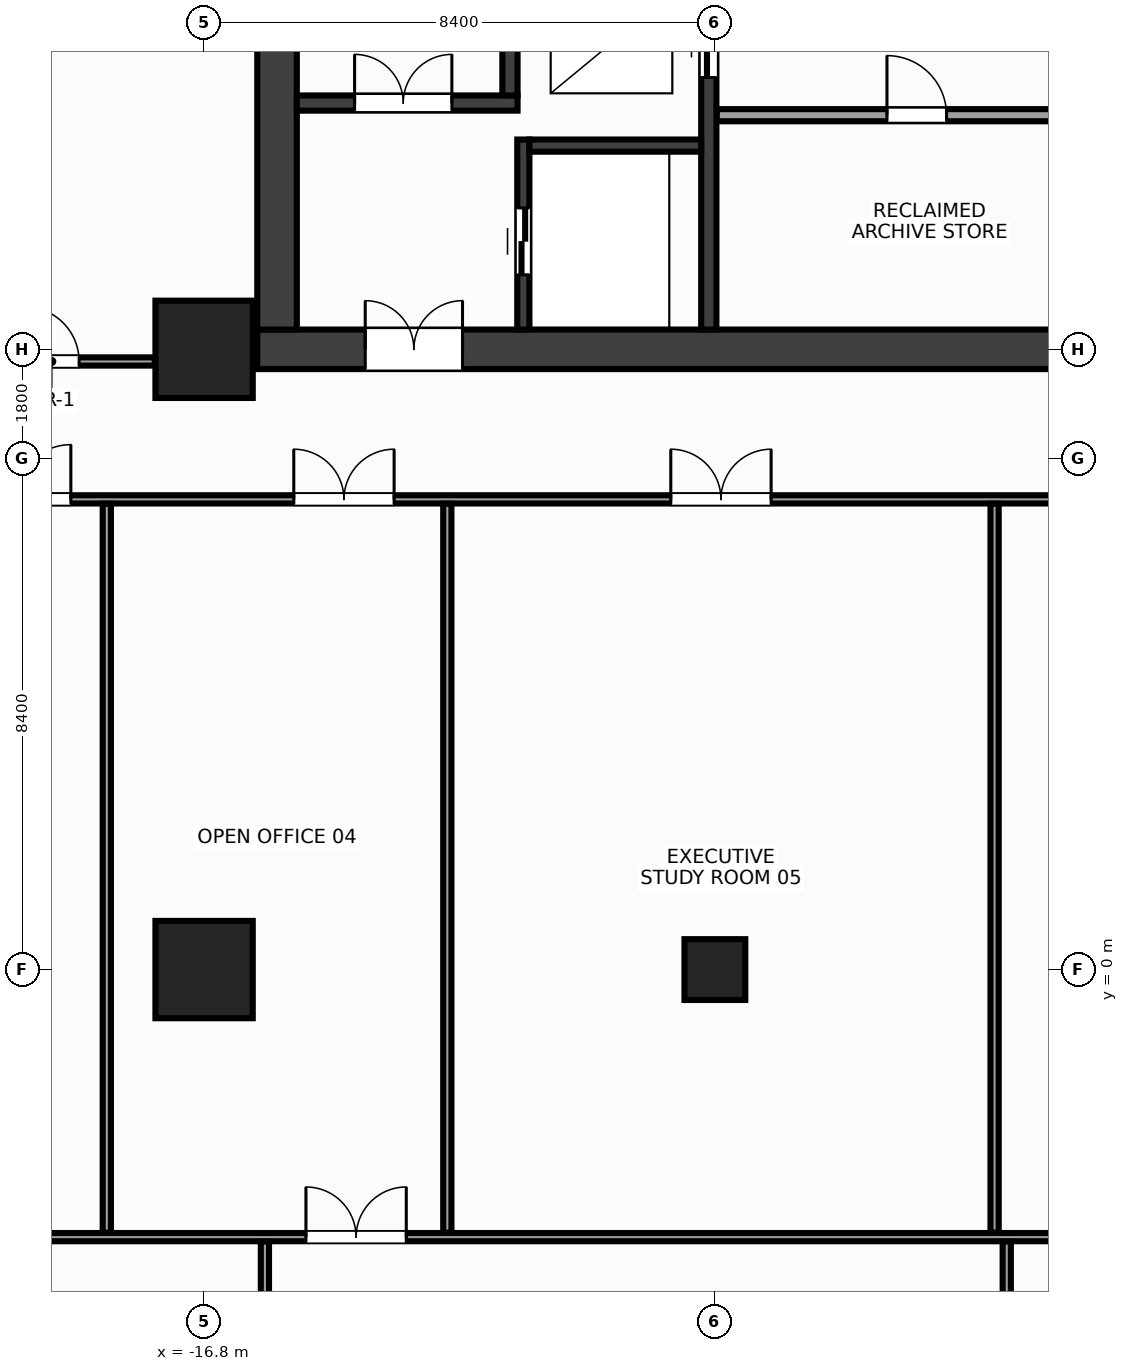
"""IFC4 building model, lengths in metres.
Left out: names, types, materials, properties, quantities, classifications, styles, units other than length and angle.
Written with IfcOpenShell. Run it as: python <this file> out.ifc"""

import sys

from ifc_helpers import new_model, si_unit, direction, frame, frame_2d, origin, origin_2d, place, context, subcontext, project, spatial, rectangle, hollow_rectangle, extrude, source, transform, mapped, element, fill, save


model = new_model("IFC4")
c1 = context("Model", 3, precision=1e-05, world=origin(), true_north=direction((0.0, 1.0)))
c2 = subcontext(c1, "Body", "Model", "MODEL_VIEW")
j1 = project(units=[si_unit("LENGTHUNIT", "METRE"), si_unit("PLANEANGLEUNIT", "RADIAN")], contexts=[c1])
p1 = place(None, origin())
s1 = spatial("IfcSite", under=j1, at=p1, CompositionType="ELEMENT")
p2 = place(p1, origin())
s2 = spatial("IfcBuilding", under=s1, at=p2, CompositionType="ELEMENT")
p3 = place(p2, frame((0.0, 0.0, 131.6)))
s3 = spatial("IfcBuildingStorey", under=s2, at=p3, CompositionType="ELEMENT", Elevation=131.6)
m1 = source(origin(), c2, "Body", "SweptSolid", [
    extrude(rectangle(XDim=31.85, YDim=0.65, at=frame_2d((15.925, 0.0))), origin(), (0.0, 0.0, 1.0), 3.6),
])
p4 = place(p3, frame((-15.925, 10.2, 0.0), z_axis=(0.0, 0.0, 1.0), x_axis=(1.0, 0.0, 0.0)))
e1 = element("IfcWall", 1, at=p4, inside=s3, PredefinedType="SHEAR", context=c2, shape_type="MappedRepresentation", body=[
    mapped(m1, transform((0.0, 0.0, 0.0), x_axis=(1.0, 0.0, 0.0), y_axis=(0.0, 1.0, 0.0), z_axis=(0.0, 0.0, 1.0), scale=1.0)),
])
p5 = place(p4, frame((1.775, 0.0, 0.0)))
e2 = element("IfcOpeningElement", 2, at=p5, cuts=e1, PredefinedType="OPENING", context=c2, shape_type="SweptSolid", body=[
    extrude(rectangle(XDim=1.6, YDim=2.15, at=frame_2d((0.8, 1.075))), frame((0.0, 0.337, 0.0), z_axis=(0.0, -1.0, 0.0), x_axis=(1.0, 0.0, 0.0)), (0.0, 0.0, 1.0), 0.674),
])
p6 = place(p4, frame((28.475, 0.0, 0.0)))
e3 = element("IfcOpeningElement", 3, at=p6, cuts=e1, PredefinedType="OPENING", context=c2, shape_type="SweptSolid", body=[
    extrude(rectangle(XDim=1.6, YDim=2.15, at=frame_2d((0.8, 1.075))), frame((0.0, 0.337, 0.0), z_axis=(0.0, -1.0, 0.0), x_axis=(1.0, 0.0, 0.0)), (0.0, 0.0, 1.0), 0.674),
])
p7 = place(p4, frame((15.175, 0.0, 0.0)))
e4 = element("IfcOpeningElement", 4, at=p7, cuts=e1, PredefinedType="OPENING", context=c2, shape_type="SweptSolid", body=[
    extrude(rectangle(XDim=1.5, YDim=2.2, at=frame_2d((0.75, 1.1))), frame((0.0, 0.337, 0.0), z_axis=(0.0, -1.0, 0.0), x_axis=(1.0, 0.0, 0.0)), (0.0, 0.0, 1.0), 0.674),
])
m2 = source(origin(), c2, "Body", "SweptSolid", [
    extrude(rectangle(XDim=12.95, YDim=0.65, at=frame_2d((6.475, 0.0))), origin(), (0.0, 0.0, 1.0), 3.6),
])
p8 = place(p3, frame((-15.6, 10.525, 0.0), z_axis=(0.0, 0.0, 1.0), x_axis=(0.0, 1.0, 0.0)))
e5 = element("IfcWall", 5, at=p8, inside=s3, PredefinedType="SHEAR", context=c2, shape_type="MappedRepresentation", body=[
    mapped(m2, transform((0.0, 0.0, 0.0), x_axis=(1.0, 0.0, 0.0), y_axis=(0.0, 1.0, 0.0), z_axis=(0.0, 0.0, 1.0), scale=1.0)),
])
m3 = source(origin(), c2, "Body", "SweptSolid", [
    extrude(rectangle(XDim=12.95, YDim=0.25, at=frame_2d((6.475, 0.0))), origin(), (0.0, 0.0, 1.0), 3.6),
])
p9 = place(p3, frame((-8.5, 10.525, 0.0), z_axis=(0.0, 0.0, 1.0), x_axis=(0.0, 1.0, 0.0)))
e6 = element("IfcWall", 6, at=p9, inside=s3, PredefinedType="SHEAR", context=c2, shape_type="MappedRepresentation", body=[
    mapped(m3, transform((0.0, 0.0, 0.0), x_axis=(1.0, 0.0, 0.0), y_axis=(0.0, 1.0, 0.0), z_axis=(0.0, 0.0, 1.0), scale=1.0)),
])
p10 = place(p9, frame((4.145, 0.0, 0.0)))
e7 = element("IfcOpeningElement", 7, at=p10, cuts=e6, PredefinedType="OPENING", context=c2, shape_type="SweptSolid", body=[
    extrude(rectangle(XDim=1.1, YDim=2.15, at=frame_2d((0.55, 1.075))), frame((0.0, 0.137, 0.0), z_axis=(0.0, -1.0, 0.0), x_axis=(1.0, 0.0, 0.0)), (0.0, 0.0, 1.0), 0.274),
])
p11 = place(p9, frame((6.065, 0.0, 0.0)))
e8 = element("IfcOpeningElement", 8, at=p11, cuts=e6, PredefinedType="OPENING", context=c2, shape_type="SweptSolid", body=[
    extrude(rectangle(XDim=1.1, YDim=2.15, at=frame_2d((0.55, 1.075))), frame((0.0, 0.137, 0.0), z_axis=(0.0, -1.0, 0.0), x_axis=(1.0, 0.0, 0.0)), (0.0, 0.0, 1.0), 0.274),
])
p12 = place(p9, frame((7.985, 0.0, 0.0)))
e9 = element("IfcOpeningElement", 9, at=p12, cuts=e6, PredefinedType="OPENING", context=c2, shape_type="SweptSolid", body=[
    extrude(rectangle(XDim=1.1, YDim=2.15, at=frame_2d((0.55, 1.075))), frame((0.0, 0.137, 0.0), z_axis=(0.0, -1.0, 0.0), x_axis=(1.0, 0.0, 0.0)), (0.0, 0.0, 1.0), 0.274),
])
m4 = source(origin(), c2, "Body", "SweptSolid", [
    extrude(rectangle(XDim=3.63, YDim=0.25, at=frame_2d((1.815, 0.0))), origin(), (0.0, 0.0, 1.0), 3.6),
])
p13 = place(p3, frame((-15.275, 14.25, 0.0), z_axis=(0.0, 0.0, 1.0), x_axis=(1.0, 0.0, 0.0)))
e10 = element("IfcWall", 10, at=p13, inside=s3, PredefinedType="SHEAR", context=c2, shape_type="MappedRepresentation", body=[
    mapped(m4, transform((0.0, 0.0, 0.0), x_axis=(1.0, 0.0, 0.0), y_axis=(0.0, 1.0, 0.0), z_axis=(0.0, 0.0, 1.0), scale=1.0)),
])
p14 = place(p13, frame((0.95, 0.0, 0.0)))
e11 = element("IfcOpeningElement", 11, at=p14, cuts=e10, PredefinedType="OPENING", context=c2, shape_type="SweptSolid", body=[
    extrude(rectangle(XDim=1.6, YDim=2.15, at=frame_2d((0.8, 1.075))), frame((0.0, 0.137, 0.0), z_axis=(0.0, -1.0, 0.0), x_axis=(1.0, 0.0, 0.0)), (0.0, 0.0, 1.0), 0.274),
])
m5 = source(origin(), c2, "Body", "SweptSolid", [
    extrude(rectangle(XDim=9.1, YDim=0.25, at=frame_2d((4.55, 0.0))), origin(), (0.0, 0.0, 1.0), 3.6),
])
p15 = place(p3, frame((-11.77, 14.375, 0.0), z_axis=(0.0, 0.0, 1.0), x_axis=(0.0, 1.0, 0.0)))
e12 = element("IfcWall", 12, at=p15, inside=s3, PredefinedType="SHEAR", context=c2, shape_type="MappedRepresentation", body=[
    mapped(m5, transform((0.0, 0.0, 0.0), x_axis=(1.0, 0.0, 0.0), y_axis=(0.0, 1.0, 0.0), z_axis=(0.0, 0.0, 1.0), scale=1.0)),
])
m6 = source(origin(), c2, "Body", "SweptSolid", [
    extrude(rectangle(XDim=3.125, YDim=0.2, at=frame_2d((1.562, 0.0))), origin(), (0.0, 0.0, 1.0), 3.6),
])
p16 = place(p3, frame((-11.55, 10.525, 0.0), z_axis=(0.0, 0.0, 1.0), x_axis=(0.0, 1.0, 0.0)))
e13 = element("IfcWall", 13, at=p16, inside=s3, PredefinedType="SHEAR", context=c2, shape_type="MappedRepresentation", body=[
    mapped(m6, transform((0.0, 0.0, 0.0), x_axis=(1.0, 0.0, 0.0), y_axis=(0.0, 1.0, 0.0), z_axis=(0.0, 0.0, 1.0), scale=1.0)),
])
p17 = place(p16, frame((0.9, 0.0, 0.0)))
e14 = element("IfcOpeningElement", 14, at=p17, cuts=e13, PredefinedType="OPENING", context=c2, shape_type="SweptSolid", body=[
    extrude(rectangle(XDim=1.1, YDim=2.15, at=frame_2d((0.55, 1.075))), frame((0.0, 0.112, 0.0), z_axis=(0.0, -1.0, 0.0), x_axis=(1.0, 0.0, 0.0)), (0.0, 0.0, 1.0), 0.224),
])
m7 = source(origin(), c2, "Body", "SweptSolid", [
    extrude(rectangle(XDim=2.825, YDim=0.2, at=frame_2d((1.413, 0.0))), origin(), (0.0, 0.0, 1.0), 3.6),
])
p18 = place(p3, frame((-11.45, 13.55, 0.0), z_axis=(0.0, 0.0, 1.0), x_axis=(1.0, 0.0, 0.0)))
e15 = element("IfcWall", 15, at=p18, inside=s3, PredefinedType="SHEAR", context=c2, shape_type="MappedRepresentation", body=[
    mapped(m7, transform((0.0, 0.0, 0.0), x_axis=(1.0, 0.0, 0.0), y_axis=(0.0, 1.0, 0.0), z_axis=(0.0, 0.0, 1.0), scale=1.0)),
])
m8 = source(origin(), c2, "Body", "SweptSolid", [
    extrude(rectangle(XDim=1.6, YDim=1.6, at=origin_2d()), origin(), (0.0, 0.0, 1.0), 3.6),
])
for number, where, z_axis, x_axis in (
    (16, (-16.8, 0.0, 0.0), (0.0, 0.0, 1.0), (1.0, 0.0, 0.0)),
    (17, (-16.8, 10.2, 0.0), (0.0, 0.0, 1.0), (1.0, 0.0, 0.0)),
):
    element("IfcColumn", number, at=place(p3, frame(where, z_axis=z_axis, x_axis=x_axis)), inside=s3, PredefinedType="COLUMN", context=c2, shape_type="MappedRepresentation", body=[
        mapped(m8, transform((0.0, 0.0, 0.0), x_axis=(1.0, 0.0, 0.0), y_axis=(0.0, 1.0, 0.0), z_axis=(0.0, 0.0, 1.0), scale=1.0)),
    ])
m9 = source(origin(), c2, "Body", "SweptSolid", [
    extrude(hollow_rectangle(XDim=1.0, YDim=1.0, WallThickness=0.045, at=origin_2d()), origin(), (0.0, 0.0, 1.0), 3.6),
])
p19 = place(p3, frame((-8.4, 0.0, 0.0), z_axis=(0.0, 0.0, 1.0), x_axis=(1.0, 0.0, 0.0)))
e18 = element("IfcColumn", 18, at=p19, inside=s3, PredefinedType="COLUMN", context=c2, shape_type="MappedRepresentation", body=[
    mapped(m9, transform((0.0, 0.0, 0.0), x_axis=(1.0, 0.0, 0.0), y_axis=(0.0, 1.0, 0.0), z_axis=(0.0, 0.0, 1.0), scale=1.0)),
])
m10 = source(origin(), c2, "Body", "SweptSolid", [
    extrude(rectangle(XDim=7.07, YDim=0.2, at=frame_2d((3.535, 0.0))), origin(), (0.0, 0.0, 1.0), 3.38),
])
p20 = place(p3, frame((-8.37, 14.05, 0.0), z_axis=(0.0, 0.0, 1.0), x_axis=(1.0, 0.0, 0.0)))
e19 = element("IfcWall", 19, at=p20, inside=s3, PredefinedType="PARTITIONING", context=c2, shape_type="MappedRepresentation", body=[
    mapped(m10, transform((0.0, 0.0, 0.0), x_axis=(1.0, 0.0, 0.0), y_axis=(0.0, 1.0, 0.0), z_axis=(0.0, 0.0, 1.0), scale=1.0)),
])
p21 = place(p20, frame((2.8, 0.0, 0.0)))
e20 = element("IfcOpeningElement", 20, at=p21, cuts=e19, PredefinedType="OPENING", context=c2, shape_type="SweptSolid", body=[
    extrude(rectangle(XDim=0.98, YDim=2.15, at=frame_2d((0.49, 1.075))), frame((0.0, 0.112, 0.0), z_axis=(0.0, -1.0, 0.0), x_axis=(1.0, 0.0, 0.0)), (0.0, 0.0, 1.0), 0.224),
])
m11 = source(origin(), c2, "Body", "SweptSolid", [
    extrude(rectangle(XDim=4.38, YDim=0.135, at=frame_2d((2.19, 0.0))), origin(), (0.0, 0.0, 1.0), 2.915),
])
p22 = place(p3, frame((-21.99, 10.0, 0.0), z_axis=(0.0, 0.0, 1.0), x_axis=(1.0, 0.0, 0.0)))
e21 = element("IfcWall", 21, at=p22, inside=s3, PredefinedType="PARTITIONING", context=c2, shape_type="MappedRepresentation", body=[
    mapped(m11, transform((0.0, 0.0, 0.0), x_axis=(1.0, 0.0, 0.0), y_axis=(0.0, 1.0, 0.0), z_axis=(0.0, 0.0, 1.0), scale=1.0)),
])
p23 = place(p22, frame((2.235, 0.0, 0.0)))
e22 = element("IfcOpeningElement", 22, at=p23, cuts=e21, PredefinedType="OPENING", context=c2, shape_type="SweptSolid", body=[
    extrude(rectangle(XDim=0.9, YDim=2.15, at=frame_2d((0.45, 1.075))), frame((0.0, 0.08, 0.0), z_axis=(0.0, -1.0, 0.0), x_axis=(1.0, 0.0, 0.0)), (0.0, 0.0, 1.0), 0.159),
])
m12 = source(origin(), c2, "Body", "SweptSolid", [
    extrude(rectangle(XDim=31.6, YDim=0.135, at=frame_2d((15.8, 0.0))), origin(), (0.0, 0.0, 1.0), 2.765),
])
p24 = place(p3, frame((-20.535, 7.732, 0.0), z_axis=(0.0, 0.0, 1.0), x_axis=(1.0, 0.0, 0.0)))
e23 = element("IfcWall", 23, at=p24, inside=s3, PredefinedType="PARTITIONING", context=c2, shape_type="MappedRepresentation", body=[
    mapped(m12, transform((0.0, 0.0, 0.0), x_axis=(1.0, 0.0, 0.0), y_axis=(0.0, 1.0, 0.0), z_axis=(0.0, 0.0, 1.0), scale=1.0)),
])
p25 = place(p24, frame((0.644, 0.0, 0.0)))
e24 = element("IfcOpeningElement", 24, at=p25, cuts=e23, PredefinedType="OPENING", context=c2, shape_type="SweptSolid", body=[
    extrude(rectangle(XDim=0.9, YDim=2.15, at=frame_2d((0.45, 1.075))), frame((0.0, 0.08, 0.0), z_axis=(0.0, -1.0, 0.0), x_axis=(1.0, 0.0, 0.0)), (0.0, 0.0, 1.0), 0.159),
])
p26 = place(p24, frame((5.21, 0.0, 0.0)))
e25 = element("IfcOpeningElement", 25, at=p26, cuts=e23, PredefinedType="OPENING", context=c2, shape_type="SweptSolid", body=[
    extrude(rectangle(XDim=1.65, YDim=2.35, at=frame_2d((0.825, 1.175))), frame((0.0, 0.08, 0.0), z_axis=(0.0, -1.0, 0.0), x_axis=(1.0, 0.0, 0.0)), (0.0, 0.0, 1.0), 0.159),
])
p27 = place(p24, frame((11.41, 0.0, 0.0)))
e26 = element("IfcOpeningElement", 26, at=p27, cuts=e23, PredefinedType="OPENING", context=c2, shape_type="SweptSolid", body=[
    extrude(rectangle(XDim=1.65, YDim=2.35, at=frame_2d((0.825, 1.175))), frame((0.0, 0.08, 0.0), z_axis=(0.0, -1.0, 0.0), x_axis=(1.0, 0.0, 0.0)), (0.0, 0.0, 1.0), 0.159),
])
p28 = place(p24, frame((19.91, 0.0, 0.0)))
e27 = element("IfcOpeningElement", 27, at=p28, cuts=e23, PredefinedType="OPENING", context=c2, shape_type="SweptSolid", body=[
    extrude(rectangle(XDim=1.65, YDim=2.35, at=frame_2d((0.825, 1.175))), frame((0.0, 0.08, 0.0), z_axis=(0.0, -1.0, 0.0), x_axis=(1.0, 0.0, 0.0)), (0.0, 0.0, 1.0), 0.159),
])
p29 = place(p24, frame((27.316, 0.0, 0.0)))
e28 = element("IfcOpeningElement", 28, at=p29, cuts=e23, PredefinedType="OPENING", context=c2, shape_type="SweptSolid", body=[
    extrude(rectangle(XDim=1.65, YDim=2.35, at=frame_2d((0.825, 1.175))), frame((0.0, 0.08, 0.0), z_axis=(0.0, -1.0, 0.0), x_axis=(1.0, 0.0, 0.0)), (0.0, 0.0, 1.0), 0.159),
])
m13 = source(origin(), c2, "Body", "SweptSolid", [
    extrude(rectangle(XDim=34.91, YDim=0.135, at=frame_2d((17.455, 0.0))), origin(), (0.0, 0.0, 1.0), 2.765),
])
p30 = place(p3, frame((-23.85, -4.4, 0.0), z_axis=(0.0, 0.0, 1.0), x_axis=(1.0, 0.0, 0.0)))
e29 = element("IfcWall", 29, at=p30, inside=s3, PredefinedType="PARTITIONING", context=c2, shape_type="MappedRepresentation", body=[
    mapped(m13, transform((0.0, 0.0, 0.0), x_axis=(1.0, 0.0, 0.0), y_axis=(0.0, 1.0, 0.0), z_axis=(0.0, 0.0, 1.0), scale=1.0)),
])
p31 = place(p30, frame((1.266, 0.0, 0.0)))
e30 = element("IfcOpeningElement", 30, at=p31, cuts=e29, PredefinedType="OPENING", context=c2, shape_type="SweptSolid", body=[
    extrude(rectangle(XDim=1.65, YDim=2.35, at=frame_2d((0.825, 1.175))), frame((0.0, 0.08, 0.0), z_axis=(0.0, -1.0, 0.0), x_axis=(1.0, 0.0, 0.0)), (0.0, 0.0, 1.0), 0.159),
])
p32 = place(p30, frame((8.725, 0.0, 0.0)))
e31 = element("IfcOpeningElement", 31, at=p32, cuts=e29, PredefinedType="OPENING", context=c2, shape_type="SweptSolid", body=[
    extrude(rectangle(XDim=1.65, YDim=2.35, at=frame_2d((0.825, 1.175))), frame((0.0, 0.08, 0.0), z_axis=(0.0, -1.0, 0.0), x_axis=(1.0, 0.0, 0.0)), (0.0, 0.0, 1.0), 0.159),
])
p33 = place(p30, frame((23.325, 0.0, 0.0)))
e32 = element("IfcOpeningElement", 32, at=p33, cuts=e29, PredefinedType="OPENING", context=c2, shape_type="SweptSolid", body=[
    extrude(rectangle(XDim=1.65, YDim=2.35, at=frame_2d((0.825, 1.175))), frame((0.0, 0.08, 0.0), z_axis=(0.0, -1.0, 0.0), x_axis=(1.0, 0.0, 0.0)), (0.0, 0.0, 1.0), 0.159),
])
m14 = source(origin(), c2, "Body", "SweptSolid", [
    extrude(rectangle(XDim=11.987, YDim=0.135, at=frame_2d((5.994, 0.0))), origin(), (0.0, 0.0, 1.0), 2.915),
])
p34 = place(p3, frame((-18.4, -4.327, 0.0), z_axis=(0.0, 0.0, 1.0), x_axis=(0.0, 1.0, 0.0)))
e33 = element("IfcWall", 33, at=p34, inside=s3, PredefinedType="PARTITIONING", context=c2, shape_type="MappedRepresentation", body=[
    mapped(m14, transform((0.0, 0.0, 0.0), x_axis=(1.0, 0.0, 0.0), y_axis=(0.0, 1.0, 0.0), z_axis=(0.0, 0.0, 1.0), scale=1.0)),
])
m15 = source(origin(), c2, "Body", "SweptSolid", [
    extrude(rectangle(XDim=11.987, YDim=0.135, at=frame_2d((5.994, 0.0))), origin(), (0.0, 0.0, 1.0), 2.665),
])
for number, where, z_axis, x_axis in (
    (34, (-12.8, -4.327, 0.0), (0.0, 0.0, 1.0), (0.0, 1.0, 0.0)),
    (35, (-3.8, -4.327, 0.0), (0.0, 0.0, 1.0), (0.0, 1.0, 0.0)),
):
    element("IfcWall", number, at=place(p3, frame(where, z_axis=z_axis, x_axis=x_axis)), inside=s3, PredefinedType="PARTITIONING", context=c2, shape_type="MappedRepresentation", body=[
        mapped(m15, transform((0.0, 0.0, 0.0), x_axis=(1.0, 0.0, 0.0), y_axis=(0.0, 1.0, 0.0), z_axis=(0.0, 0.0, 1.0), scale=1.0)),
    ])
m16 = source(origin(), c2, "Body", "SweptSolid", [
    extrude(rectangle(XDim=18.177, YDim=0.135, at=frame_2d((9.089, 0.0))), origin(), (0.0, 0.0, 1.0), 2.915),
])
for number, where, z_axis, x_axis in (
    (36, (-15.8, -22.65, 0.0), (0.0, 0.0, 1.0), (0.0, 1.0, 0.0)),
    (37, (-3.6, -22.65, 0.0), (0.0, 0.0, 1.0), (0.0, 1.0, 0.0)),
):
    element("IfcWall", number, at=place(p3, frame(where, z_axis=z_axis, x_axis=x_axis)), inside=s3, PredefinedType="PARTITIONING", context=c2, shape_type="MappedRepresentation", body=[
        mapped(m16, transform((0.0, 0.0, 0.0), x_axis=(1.0, 0.0, 0.0), y_axis=(0.0, 1.0, 0.0), z_axis=(0.0, 0.0, 1.0), scale=1.0)),
    ])
m17 = source(origin(), c2, "Body", "SweptSolid", [
    extrude(rectangle(XDim=1.6, YDim=2.15, at=frame_2d((0.8, 1.075))), frame((0.0, 0.025, 0.0), z_axis=(0.0, -1.0, 0.0), x_axis=(1.0, 0.0, 0.0)), (0.0, 0.0, 1.0), 0.05),
])
p35 = place(p14, origin())
e38 = element("IfcDoor", 38, at=p35, inside=s3, OperationType="DOUBLE_DOOR_SINGLE_SWING", PredefinedType="DOOR", context=c2, shape_type="MappedRepresentation", body=[
    mapped(m17, transform((0.0, 0.0, 0.0), x_axis=(1.0, 0.0, 0.0), y_axis=(0.0, 1.0, 0.0), z_axis=(0.0, 0.0, 1.0), scale=1.0)),
])
fill(e11, e38)
p36 = place(p5, origin())
e39 = element("IfcDoor", 39, at=p36, inside=s3, OperationType="DOUBLE_DOOR_SINGLE_SWING", PredefinedType="DOOR", context=c2, shape_type="MappedRepresentation", body=[
    mapped(m17, transform((0.0, 0.0, 0.0), x_axis=(1.0, 0.0, 0.0), y_axis=(0.0, 1.0, 0.0), z_axis=(0.0, 0.0, 1.0), scale=1.0)),
])
fill(e2, e39)
m18 = source(origin(), c2, "Body", "SweptSolid", [
    extrude(rectangle(XDim=1.1, YDim=2.15, at=frame_2d((0.55, 1.075))), frame((0.0, 0.025, 0.0), z_axis=(0.0, -1.0, 0.0), x_axis=(1.0, 0.0, 0.0)), (0.0, 0.0, 1.0), 0.05),
])
p37 = place(p17, origin())
e40 = element("IfcDoor", 40, at=p37, inside=s3, OperationType="DOUBLE_DOOR_SLIDING", PredefinedType="DOOR", context=c2, shape_type="MappedRepresentation", body=[
    mapped(m18, transform((0.0, 0.0, 0.0), x_axis=(1.0, 0.0, 0.0), y_axis=(0.0, 1.0, 0.0), z_axis=(0.0, 0.0, 1.0), scale=1.0)),
])
fill(e14, e40)
p38 = place(p10, origin())
e41 = element("IfcDoor", 41, at=p38, inside=s3, OperationType="DOUBLE_DOOR_SLIDING", PredefinedType="DOOR", context=c2, shape_type="MappedRepresentation", body=[
    mapped(m18, transform((0.0, 0.0, 0.0), x_axis=(1.0, 0.0, 0.0), y_axis=(0.0, 1.0, 0.0), z_axis=(0.0, 0.0, 1.0), scale=1.0)),
])
fill(e7, e41)
m19 = source(origin(), c2, "Body", "SweptSolid", [
    extrude(rectangle(XDim=0.98, YDim=2.15, at=frame_2d((0.49, 1.075))), frame((0.0, 0.025, 0.0), z_axis=(0.0, -1.0, 0.0), x_axis=(1.0, 0.0, 0.0)), (0.0, 0.0, 1.0), 0.05),
])
p39 = place(p21, origin())
e42 = element("IfcDoor", 42, at=p39, inside=s3, OperationType="SINGLE_SWING_LEFT", PredefinedType="DOOR", context=c2, shape_type="MappedRepresentation", body=[
    mapped(m19, transform((0.0, 0.0, 0.0), x_axis=(1.0, 0.0, 0.0), y_axis=(0.0, 1.0, 0.0), z_axis=(0.0, 0.0, 1.0), scale=1.0)),
])
fill(e20, e42)
m20 = source(origin(), c2, "Body", "SweptSolid", [
    extrude(rectangle(XDim=0.9, YDim=2.15, at=frame_2d((0.45, 1.075))), frame((0.0, 0.025, 0.0), z_axis=(0.0, -1.0, 0.0), x_axis=(1.0, 0.0, 0.0)), (0.0, 0.0, 1.0), 0.05),
])
p40 = place(p23, origin())
e43 = element("IfcDoor", 43, at=p40, inside=s3, OperationType="SINGLE_SWING_LEFT", PredefinedType="DOOR", context=c2, shape_type="MappedRepresentation", body=[
    mapped(m20, transform((0.0, 0.0, 0.0), x_axis=(1.0, 0.0, 0.0), y_axis=(0.0, 1.0, 0.0), z_axis=(0.0, 0.0, 1.0), scale=1.0)),
])
fill(e22, e43)
p41 = place(p25, origin())
e44 = element("IfcDoor", 44, at=p41, inside=s3, OperationType="SINGLE_SWING_RIGHT", PredefinedType="DOOR", context=c2, shape_type="MappedRepresentation", body=[
    mapped(m20, transform((0.0, 0.0, 0.0), x_axis=(1.0, 0.0, 0.0), y_axis=(0.0, 1.0, 0.0), z_axis=(0.0, 0.0, 1.0), scale=1.0)),
])
fill(e24, e44)
m21 = source(origin(), c2, "Body", "SweptSolid", [
    extrude(rectangle(XDim=1.65, YDim=2.35, at=frame_2d((0.825, 1.175))), frame((0.0, 0.025, 0.0), z_axis=(0.0, -1.0, 0.0), x_axis=(1.0, 0.0, 0.0)), (0.0, 0.0, 1.0), 0.05),
])
p42 = place(p26, origin())
e45 = element("IfcDoor", 45, at=p42, inside=s3, OperationType="DOUBLE_DOOR_SINGLE_SWING", PredefinedType="DOOR", context=c2, shape_type="MappedRepresentation", body=[
    mapped(m21, transform((0.0, 0.0, 0.0), x_axis=(1.0, 0.0, 0.0), y_axis=(0.0, 1.0, 0.0), z_axis=(0.0, 0.0, 1.0), scale=1.0)),
])
fill(e25, e45)
p43 = place(p27, origin())
e46 = element("IfcDoor", 46, at=p43, inside=s3, OperationType="DOUBLE_DOOR_SINGLE_SWING", PredefinedType="DOOR", context=c2, shape_type="MappedRepresentation", body=[
    mapped(m21, transform((0.0, 0.0, 0.0), x_axis=(1.0, 0.0, 0.0), y_axis=(0.0, 1.0, 0.0), z_axis=(0.0, 0.0, 1.0), scale=1.0)),
])
fill(e26, e46)
p44 = place(p32, origin())
e47 = element("IfcDoor", 47, at=p44, inside=s3, OperationType="DOUBLE_DOOR_SINGLE_SWING", PredefinedType="DOOR", context=c2, shape_type="MappedRepresentation", body=[
    mapped(m21, transform((0.0, 0.0, 0.0), x_axis=(1.0, 0.0, 0.0), y_axis=(0.0, 1.0, 0.0), z_axis=(0.0, 0.0, 1.0), scale=1.0)),
])
fill(e31, e47)
save(model, sys.argv[1])
